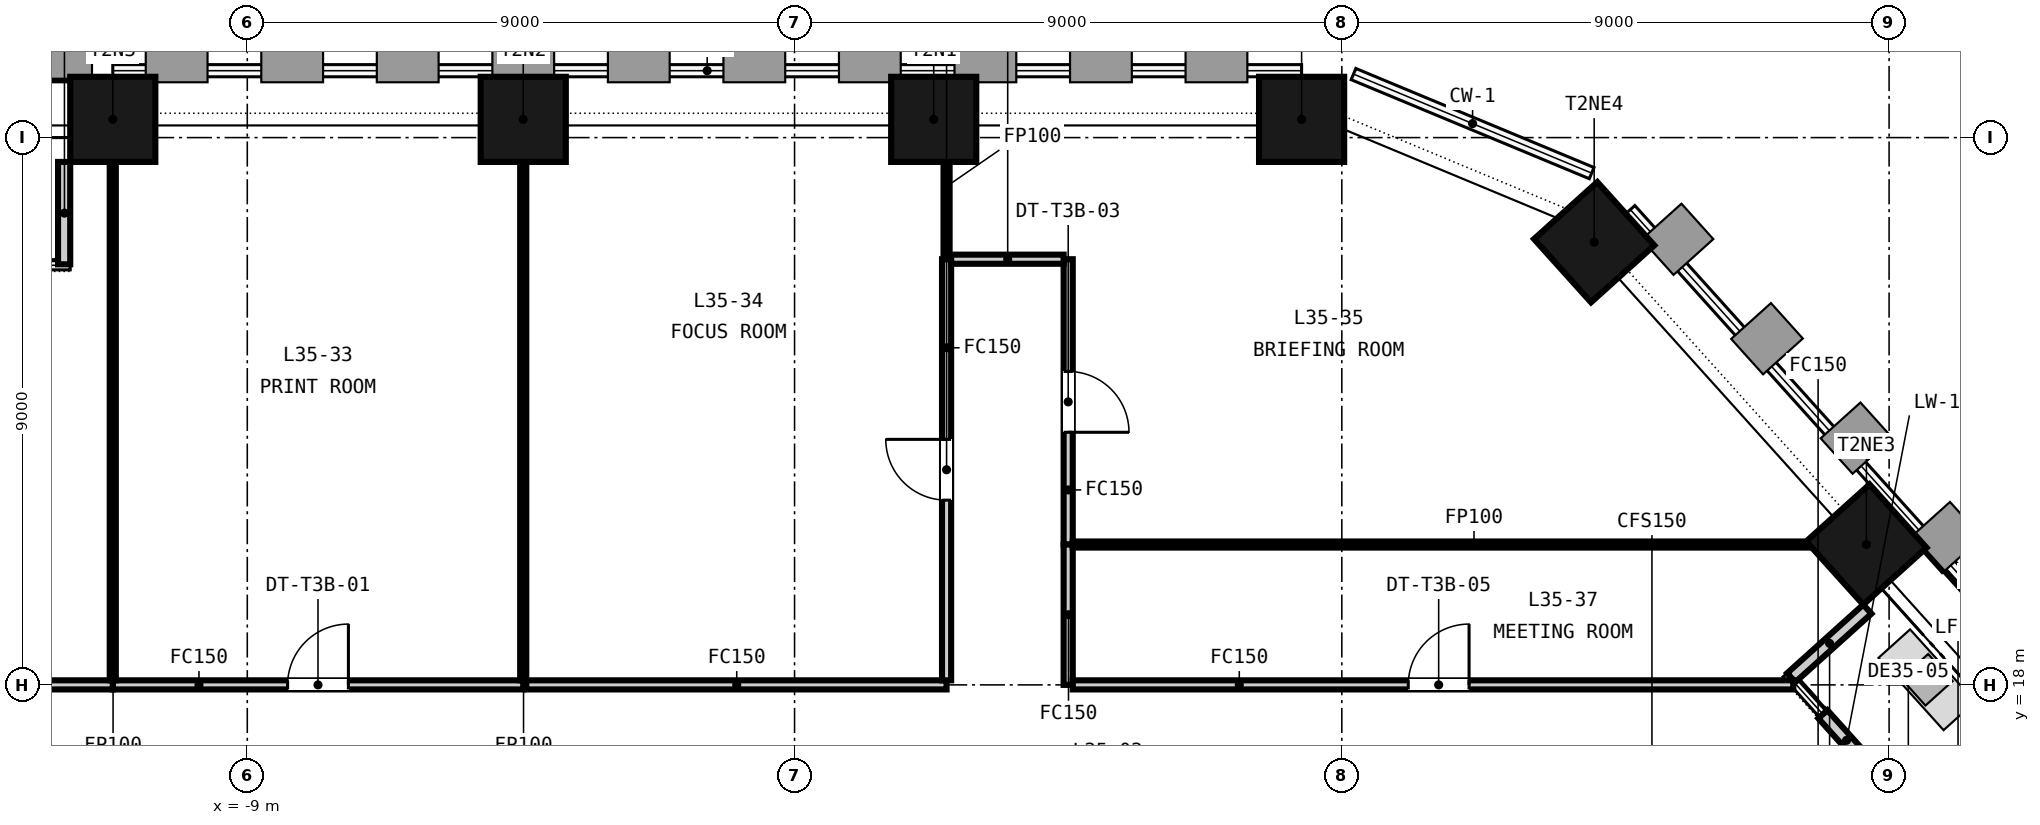
"""IFC4 building model, lengths in metres.
Left out: names, types, materials, properties, quantities, classifications, styles, units other than length and angle.
Written with IfcOpenShell. Run it as: python <this file> out.ifc"""

import sys

from ifc_helpers import new_model, si_unit, direction, frame, frame_2d, origin, origin_2d, place, context, subcontext, project, spatial, rectangle, extrude, element, fill, save


model = new_model("IFC4")
c1 = context("Model", 3, precision=1e-05, world=origin(), true_north=direction((0.0, 1.0)))
c2 = subcontext(c1, "Body", "Model", "MODEL_VIEW")
j1 = project(units=[si_unit("LENGTHUNIT", "METRE"), si_unit("PLANEANGLEUNIT", "RADIAN")], contexts=[c1])
p1 = place(None, origin())
s1 = spatial("IfcSite", under=j1, at=p1, CompositionType="ELEMENT")
p2 = place(p1, origin())
s2 = spatial("IfcBuilding", under=s1, at=p2, CompositionType="ELEMENT")
p3 = place(p2, frame((0.0, 0.0, 144.4)))
s3 = spatial("IfcBuildingStorey", under=s2, at=p3, CompositionType="ELEMENT", Elevation=144.4)
for number, where, z_axis, x_axis in (
    (1, (8.339, 27.3, -0.15), (0.0, 0.0, 1.0), (-1.0, 0.0, 0.0)),
    (2, (2.288, 27.3, -0.15), (0.0, 0.0, 1.0), (-1.0, 0.0, 0.0)),
    (3, (-4.462, 27.3, -0.15), (0.0, 0.0, 1.0), (-1.0, 0.0, 0.0)),
    (4, (-11.212, 27.3, -0.15), (0.0, 0.0, 1.0), (-1.0, 0.0, 0.0)),
    (5, (17.627, 20.308, -0.15), (0.0, 0.0, 1.0), (-0.669, 0.743, 0.0)),
    (6, (13.15, 25.28, -0.15), (0.0, 0.0, 1.0), (-0.669, 0.743, 0.0)),
):
    element("IfcColumn", number, at=place(p3, frame(where, z_axis=z_axis, x_axis=x_axis)), inside=s3, PredefinedType="COLUMN", context=c2, shape_type="SweptSolid", body=[
        extrude(rectangle(XDim=1.4, YDim=1.4, at=origin_2d()), origin(), (0.0, 0.0, 1.0), 3.65),
    ])
p4 = place(p3, frame((-12.012, 26.6, 0.0), z_axis=(0.0, 0.0, 1.0), x_axis=(0.0, -1.0, 0.0)))
e7 = element("IfcWall", 7, at=p4, inside=s3, PredefinedType="SOLIDWALL", context=c2, shape_type="SweptSolid", body=[
    extrude(rectangle(XDim=1.684, YDim=0.2, at=frame_2d((0.842, 0.0))), origin(), (0.0, 0.0, 1.0), 3.05),
])
p5 = place(p3, frame((19.721, 14.395, 0.0), z_axis=(0.0, 0.0, 1.0), x_axis=(-0.669170241733, 0.743109135712, 0.0)))
e8 = element("IfcWall", 8, at=p5, inside=s3, PredefinedType="SOLIDWALL", context=c2, shape_type="SweptSolid", body=[
    extrude(rectangle(XDim=4.2, YDim=0.2, at=frame_2d((2.1, 0.0))), origin(), (0.0, 0.0, 1.0), 2.897),
])
p6 = place(p5, frame((1.2, 0.0, 0.0)))
e9 = element("IfcOpeningElement", 9, at=p6, cuts=e8, PredefinedType="OPENING", context=c2, shape_type="SweptSolid", body=[
    extrude(rectangle(XDim=1.8, YDim=2.4, at=frame_2d((0.9, 1.2))), frame((0.0, 0.11, 0.0), z_axis=(0.0, -1.0, 0.0), x_axis=(1.0, 0.0, 0.0)), (0.0, 0.0, 1.0), 0.22),
])
p7 = place(p3, frame((17.642, 19.245, 0.0), z_axis=(0.0, 0.0, 1.0), x_axis=(-0.743106699699, -0.6691729469, 0.0)))
e10 = element("IfcWall", 10, at=p7, inside=s3, PredefinedType="SOLIDWALL", context=c2, shape_type="SweptSolid", body=[
    extrude(rectangle(XDim=1.684, YDim=0.2, at=frame_2d((0.842, 0.0))), origin(), (0.0, 0.0, 1.0), 3.05),
])
p8 = place(p3, frame((4.5, 25.0, 0.0), z_axis=(0.0, 0.0, 1.0), x_axis=(0.0, -1.0, 0.0)))
e11 = element("IfcWall", 11, at=p8, inside=s3, PredefinedType="PARTITIONING", context=c2, shape_type="SweptSolid", body=[
    extrude(rectangle(XDim=4.692, YDim=0.15, at=frame_2d((2.346, 0.0))), origin(), (0.0, 0.0, 1.0), 2.741),
])
p9 = place(p8, frame((1.846, 0.0, 0.0)))
e12 = element("IfcOpeningElement", 12, at=p9, cuts=e11, PredefinedType="OPENING", context=c2, shape_type="SweptSolid", body=[
    extrude(rectangle(XDim=1.0, YDim=2.1, at=frame_2d((0.5, 1.05))), frame((0.0, 0.085, 0.0), z_axis=(0.0, -1.0, 0.0), x_axis=(1.0, 0.0, 0.0)), (0.0, 0.0, 1.0), 0.17),
])
p10 = place(p3, frame((4.5, 20.308, 0.0), z_axis=(0.0, 0.0, 1.0), x_axis=(0.0, -1.0, 0.0)))
e13 = element("IfcWall", 13, at=p10, inside=s3, PredefinedType="PARTITIONING", context=c2, shape_type="SweptSolid", body=[
    extrude(rectangle(XDim=2.308, YDim=0.15, at=frame_2d((1.154, 0.0))), origin(), (0.0, 0.0, 1.0), 2.741),
])
p11 = place(p3, frame((-11.212, 18.0, 0.0), z_axis=(0.0, 0.0, 1.0), x_axis=(1.0, 0.0, 0.0)))
e14 = element("IfcWall", 14, at=p11, inside=s3, PredefinedType="PARTITIONING", context=c2, shape_type="SweptSolid", body=[
    extrude(rectangle(XDim=6.75, YDim=0.15, at=frame_2d((3.375, 0.0))), origin(), (0.0, 0.0, 1.0), 2.741),
])
p12 = place(p11, frame((2.875, 0.0, 0.0)))
e15 = element("IfcOpeningElement", 15, at=p12, cuts=e14, PredefinedType="OPENING", context=c2, shape_type="SweptSolid", body=[
    extrude(rectangle(XDim=1.0, YDim=2.1, at=frame_2d((0.5, 1.05))), frame((0.0, 0.085, 0.0), z_axis=(0.0, -1.0, 0.0), x_axis=(1.0, 0.0, 0.0)), (0.0, 0.0, 1.0), 0.17),
])
p13 = place(p3, frame((-4.462, 18.075, 0.0), z_axis=(0.0, 0.0, 1.0), x_axis=(0.0, 1.0, 0.0)))
e16 = element("IfcWall", 16, at=p13, inside=s3, PredefinedType="PARTITIONING", context=c2, shape_type="SweptSolid", body=[
    extrude(rectangle(XDim=9.325, YDim=0.1, at=frame_2d((4.663, 0.0))), origin(), (0.0, 0.0, 1.0), 2.741),
])
p14 = place(p3, frame((-4.412, 18.0, 0.0), z_axis=(0.0, 0.0, 1.0), x_axis=(1.0, 0.0, 0.0)))
e17 = element("IfcWall", 17, at=p14, inside=s3, PredefinedType="PARTITIONING", context=c2, shape_type="SweptSolid", body=[
    extrude(rectangle(XDim=6.912, YDim=0.15, at=frame_2d((3.456, 0.0))), origin(), (0.0, 0.0, 1.0), 2.741),
])
p15 = place(p3, frame((2.5, 18.075, 0.0), z_axis=(0.0, 0.0, 1.0), x_axis=(0.0, 1.0, 0.0)))
e18 = element("IfcWall", 18, at=p15, inside=s3, PredefinedType="PARTITIONING", context=c2, shape_type="SweptSolid", body=[
    extrude(rectangle(XDim=6.925, YDim=0.15, at=frame_2d((3.462, 0.0))), origin(), (0.0, 0.0, 1.0), 2.741),
])
p16 = place(p15, frame((2.962, 0.0, 0.0)))
e19 = element("IfcOpeningElement", 19, at=p16, cuts=e18, PredefinedType="OPENING", context=c2, shape_type="SweptSolid", body=[
    extrude(rectangle(XDim=1.0, YDim=2.1, at=frame_2d((0.5, 1.05))), frame((0.0, 0.085, 0.0), z_axis=(0.0, -1.0, 0.0), x_axis=(1.0, 0.0, 0.0)), (0.0, 0.0, 1.0), 0.17),
])
p17 = place(p3, frame((2.5, 25.0, 0.0), z_axis=(0.0, 0.0, 1.0), x_axis=(0.0, 1.0, 0.0)))
e20 = element("IfcWall", 20, at=p17, inside=s3, PredefinedType="PARTITIONING", context=c2, shape_type="SweptSolid", body=[
    extrude(rectangle(XDim=2.4, YDim=0.1, at=frame_2d((1.2, 0.0))), origin(), (0.0, 0.0, 1.0), 2.741),
])
p18 = place(p3, frame((2.575, 25.0, 0.0), z_axis=(0.0, 0.0, 1.0), x_axis=(1.0, 0.0, 0.0)))
e21 = element("IfcWall", 21, at=p18, inside=s3, PredefinedType="PARTITIONING", context=c2, shape_type="SweptSolid", body=[
    extrude(rectangle(XDim=1.85, YDim=0.15, at=frame_2d((0.925, 0.0))), origin(), (0.0, 0.0, 1.0), 2.741),
])
p19 = place(p3, frame((4.575, 20.308, 0.0), z_axis=(0.0, 0.0, 1.0), x_axis=(1.0, 0.0, 0.0)))
e22 = element("IfcWall", 22, at=p19, inside=s3, PredefinedType="PARTITIONING", context=c2, shape_type="SweptSolid", body=[
    extrude(rectangle(XDim=13.187, YDim=0.1, at=frame_2d((6.594, 0.0))), origin(), (0.0, 0.0, 1.0), 2.741),
])
p20 = place(p3, frame((-18.628, 18.0, 0.0), z_axis=(0.0, 0.0, 1.0), x_axis=(1.0, 0.0, 0.0)))
e23 = element("IfcWall", 23, at=p20, inside=s3, PredefinedType="PARTITIONING", context=c2, shape_type="SweptSolid", body=[
    extrude(rectangle(XDim=7.416, YDim=0.15, at=frame_2d((3.708, 0.0))), origin(), (0.0, 0.0, 1.0), 2.741),
])
p21 = place(p20, frame((3.258, 0.0, 0.0)))
e24 = element("IfcOpeningElement", 24, at=p21, cuts=e23, PredefinedType="OPENING", context=c2, shape_type="SweptSolid", body=[
    extrude(rectangle(XDim=0.9, YDim=2.1, at=frame_2d((0.45, 1.05))), frame((0.0, 0.085, 0.0), z_axis=(0.0, -1.0, 0.0), x_axis=(1.0, 0.0, 0.0)), (0.0, 0.0, 1.0), 0.17),
])
p22 = place(p3, frame((-11.212, 18.075, 0.0), z_axis=(0.0, 0.0, 1.0), x_axis=(0.0, 1.0, 0.0)))
e25 = element("IfcWall", 25, at=p22, inside=s3, PredefinedType="PARTITIONING", context=c2, shape_type="SweptSolid", body=[
    extrude(rectangle(XDim=9.325, YDim=0.1, at=frame_2d((4.663, 0.0))), origin(), (0.0, 0.0, 1.0), 2.741),
])
p23 = place(p3, frame((4.575, 18.0, 0.0), z_axis=(0.0, 0.0, 1.0), x_axis=(1.0, 0.0, 0.0)))
e26 = element("IfcWall", 26, at=p23, inside=s3, PredefinedType="PARTITIONING", context=c2, shape_type="SweptSolid", body=[
    extrude(rectangle(XDim=11.849, YDim=0.15, at=frame_2d((5.925, 0.0))), origin(), (0.0, 0.0, 1.0), 2.741),
])
p24 = place(p23, frame((5.518, 0.0, 0.0)))
e27 = element("IfcOpeningElement", 27, at=p24, cuts=e26, PredefinedType="OPENING", context=c2, shape_type="SweptSolid", body=[
    extrude(rectangle(XDim=1.0, YDim=2.1, at=frame_2d((0.5, 1.05))), frame((0.0, 0.085, 0.0), z_axis=(0.0, -1.0, 0.0), x_axis=(1.0, 0.0, 0.0)), (0.0, 0.0, 1.0), 0.17),
])
p25 = place(p12, origin())
e28 = element("IfcDoor", 28, at=p25, inside=s3, OperationType="SINGLE_SWING_RIGHT", PredefinedType="DOOR", context=c2, shape_type="SweptSolid", body=[
    extrude(rectangle(XDim=1.0, YDim=2.1, at=frame_2d((0.5, 1.05))), frame((0.0, 0.025, 0.0), z_axis=(0.0, -1.0, 0.0), x_axis=(1.0, 0.0, 0.0)), (0.0, 0.0, 1.0), 0.05),
])
fill(e15, e28)
p26 = place(p16, origin())
e29 = element("IfcDoor", 29, at=p26, inside=s3, OperationType="SINGLE_SWING_RIGHT", PredefinedType="DOOR", context=c2, shape_type="SweptSolid", body=[
    extrude(rectangle(XDim=1.0, YDim=2.1, at=frame_2d((0.5, 1.05))), frame((0.0, 0.025, 0.0), z_axis=(0.0, -1.0, 0.0), x_axis=(1.0, 0.0, 0.0)), (0.0, 0.0, 1.0), 0.05),
])
fill(e19, e29)
p27 = place(p9, origin())
e30 = element("IfcDoor", 30, at=p27, inside=s3, OperationType="SINGLE_SWING_RIGHT", PredefinedType="DOOR", context=c2, shape_type="SweptSolid", body=[
    extrude(rectangle(XDim=1.0, YDim=2.1, at=frame_2d((0.5, 1.05))), frame((0.0, 0.025, 0.0), z_axis=(0.0, -1.0, 0.0), x_axis=(1.0, 0.0, 0.0)), (0.0, 0.0, 1.0), 0.05),
])
fill(e12, e30)
p28 = place(p24, origin())
e31 = element("IfcDoor", 31, at=p28, inside=s3, OperationType="SINGLE_SWING_RIGHT", PredefinedType="DOOR", context=c2, shape_type="SweptSolid", body=[
    extrude(rectangle(XDim=1.0, YDim=2.1, at=frame_2d((0.5, 1.05))), frame((0.0, 0.025, 0.0), z_axis=(0.0, -1.0, 0.0), x_axis=(1.0, 0.0, 0.0)), (0.0, 0.0, 1.0), 0.05),
])
fill(e27, e31)
save(model, sys.argv[1])
